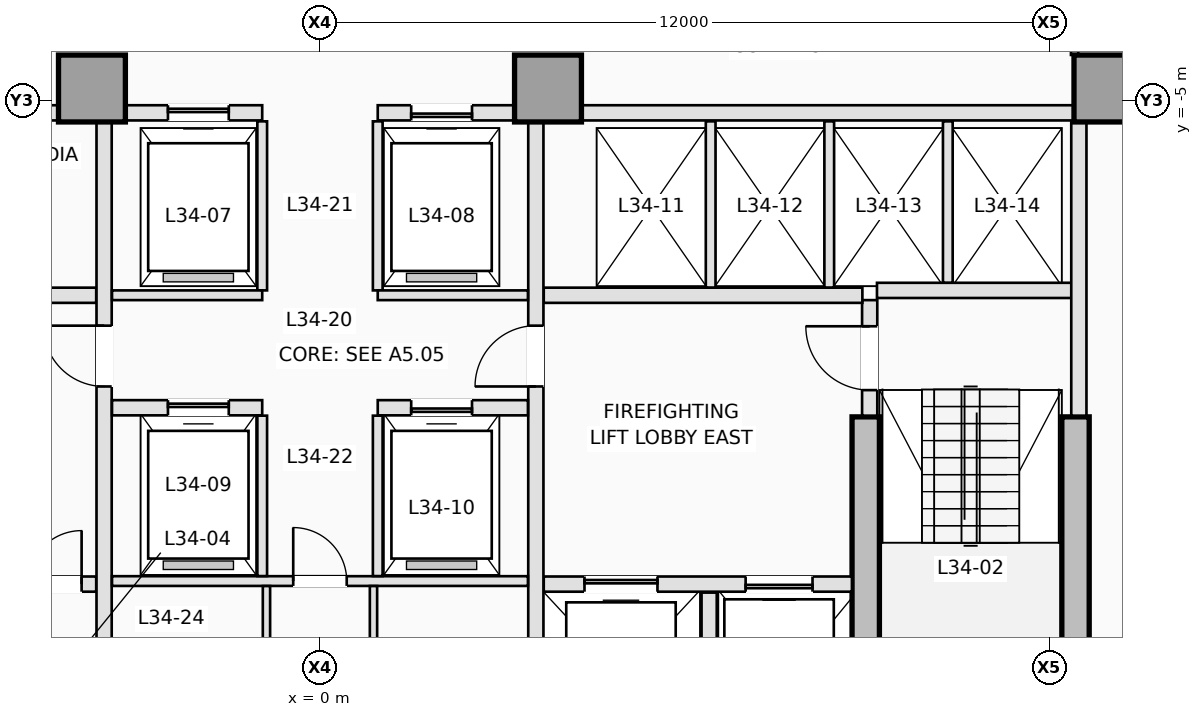
"""IFC4 building model, lengths in metres.
Left out: names, types, materials, properties, quantities, classifications, styles, units other than length and angle.
Written with IfcOpenShell. Run it as: python <this file> out.ifc"""

import sys

from ifc_helpers import new_model, si_unit, direction, frame, frame_2d, origin, origin_2d, place, context, subcontext, project, spatial, rectangle, extrude, element, fill, save


model = new_model("IFC4")
c1 = context("Model", 3, precision=1e-05, world=origin(), true_north=direction((0.0, 1.0)))
c2 = subcontext(c1, "Body", "Model", "MODEL_VIEW")
j1 = project(units=[si_unit("LENGTHUNIT", "METRE"), si_unit("PLANEANGLEUNIT", "RADIAN")], contexts=[c1])
p1 = place(None, origin())
s1 = spatial("IfcSite", under=j1, at=p1, CompositionType="ELEMENT")
p2 = place(p1, origin())
s2 = spatial("IfcBuilding", under=s1, at=p2, CompositionType="ELEMENT")
p3 = place(p2, frame((0.0, 0.0, 126.5)))
s3 = spatial("IfcBuildingStorey", under=s2, at=p3, CompositionType="ELEMENT", Elevation=126.5)
p4 = place(p3, frame((12.425, -15.725, 0.0), z_axis=(0.0, 0.0, 1.0), x_axis=(0.0, 1.0, 0.0)))
e1 = element("IfcWall", 1, at=p4, inside=s3, PredefinedType="SHEAR", context=c2, shape_type="SweptSolid", body=[
    extrude(rectangle(XDim=5.525, YDim=0.45, at=frame_2d((2.763, 0.0))), origin(), (0.0, 0.0, 1.0), 3.5),
])
p5 = place(p3, frame((8.975, -16.15, 0.0), z_axis=(0.0, 0.0, 1.0), x_axis=(0.0, 1.0, 0.0)))
e2 = element("IfcWall", 2, at=p5, inside=s3, PredefinedType="SHEAR", context=c2, shape_type="SweptSolid", body=[
    extrude(rectangle(XDim=5.95, YDim=0.45, at=frame_2d((2.975, 0.0))), origin(), (0.0, 0.0, 1.0), 3.5),
])
for number, where, z_axis, x_axis in (
    (3, (-3.75, -4.8, 0.0), (0.0, 0.0, 1.0), (1.0, 0.0, 0.0)),
    (4, (3.75, -4.8, 0.0), (0.0, 0.0, 1.0), (1.0, 0.0, 0.0)),
    (5, (12.95, -4.8, 0.0), (0.0, 0.0, 1.0), (1.0, 0.0, 0.0)),
):
    element("IfcColumn", number, at=place(p3, frame(where, z_axis=z_axis, x_axis=x_axis)), inside=s3, PredefinedType="COLUMN", context=c2, shape_type="SweptSolid", body=[
        extrude(rectangle(XDim=1.1, YDim=1.1, at=origin_2d()), origin(), (0.0, 0.0, 1.0), 3.5),
    ])
p6 = place(p3, frame((9.04, -10.18, 0.0), z_axis=(0.0, 0.0, 1.0), x_axis=(0.0, 1.0, 0.0)))
e6 = element("IfcWall", 6, at=p6, inside=s3, PredefinedType="PARTITIONING", context=c2, shape_type="SweptSolid", body=[
    extrude(rectangle(XDim=1.9, YDim=0.25, at=frame_2d((0.95, 0.0))), origin(), (0.0, 0.0, 1.0), 3.25),
])
p7 = place(p6, frame((0.42, 0.0, 0.0)))
e7 = element("IfcOpeningElement", 7, at=p7, cuts=e6, PredefinedType="OPENING", context=c2, shape_type="SweptSolid", body=[
    extrude(rectangle(XDim=1.05, YDim=2.15, at=frame_2d((0.525, 1.075))), frame((0.0, 0.135, 0.0), z_axis=(0.0, -1.0, 0.0), x_axis=(1.0, 0.0, 0.0)), (0.0, 0.0, 1.0), 0.27),
])
p8 = place(p3, frame((9.16, -8.12, 0.0), z_axis=(0.0, 0.0, 1.0), x_axis=(1.0, 0.0, 0.0)))
e8 = element("IfcWall", 8, at=p8, inside=s3, PredefinedType="PARTITIONING", context=c2, shape_type="SweptSolid", body=[
    extrude(rectangle(XDim=3.22, YDim=0.25, at=frame_2d((1.61, 0.0))), origin(), (0.0, 0.0, 1.0), 3.25),
])
p9 = place(p3, frame((12.48, -10.18, 0.0), z_axis=(0.0, 0.0, 1.0), x_axis=(0.0, 1.0, 0.0)))
e9 = element("IfcWall", 9, at=p9, inside=s3, PredefinedType="PARTITIONING", context=c2, shape_type="SweptSolid", body=[
    extrude(rectangle(XDim=4.828, YDim=0.25, at=frame_2d((2.414, 0.0))), origin(), (0.0, 0.0, 1.0), 3.25),
])
p10 = place(p3, frame((-8.748, -12.95, 0.0), z_axis=(0.0, 0.0, 1.0), x_axis=(1.0, 0.0, 0.0)))
e10 = element("IfcWall", 10, at=p10, inside=s3, PredefinedType="PARTITIONING", context=c2, shape_type="SweptSolid", body=[
    extrude(rectangle(XDim=5.068, YDim=0.25, at=frame_2d((2.534, 0.0))), origin(), (0.0, 0.0, 1.0), 3.25),
])
p11 = place(p10, frame((0.648, 0.0, 0.0)))
e11 = element("IfcOpeningElement", 11, at=p11, cuts=e10, PredefinedType="OPENING", context=c2, shape_type="SweptSolid", body=[
    extrude(rectangle(XDim=1.1, YDim=2.15, at=frame_2d((0.55, 1.075))), frame((0.0, 0.135, 0.0), z_axis=(0.0, -1.0, 0.0), x_axis=(1.0, 0.0, 0.0)), (0.0, 0.0, 1.0), 0.27),
])
p12 = place(p10, frame((2.548, 0.0, 0.0)))
e12 = element("IfcOpeningElement", 12, at=p12, cuts=e10, PredefinedType="OPENING", context=c2, shape_type="SweptSolid", body=[
    extrude(rectangle(XDim=0.88, YDim=2.1, at=frame_2d((0.44, 1.05))), frame((0.0, 0.135, 0.0), z_axis=(0.0, -1.0, 0.0), x_axis=(1.0, 0.0, 0.0)), (0.0, 0.0, 1.0), 0.27),
])
p13 = place(p10, frame((3.948, 0.0, 0.0)))
e13 = element("IfcOpeningElement", 13, at=p13, cuts=e10, PredefinedType="OPENING", context=c2, shape_type="SweptSolid", body=[
    extrude(rectangle(XDim=0.88, YDim=2.1, at=frame_2d((0.44, 1.05))), frame((0.0, 0.135, 0.0), z_axis=(0.0, -1.0, 0.0), x_axis=(1.0, 0.0, 0.0)), (0.0, 0.0, 1.0), 0.27),
])
p14 = place(p3, frame((3.68, -12.95, 0.0), z_axis=(0.0, 0.0, 1.0), x_axis=(1.0, 0.0, 0.0)))
e14 = element("IfcWall", 14, at=p14, inside=s3, PredefinedType="PARTITIONING", context=c2, shape_type="SweptSolid", body=[
    extrude(rectangle(XDim=5.068, YDim=0.25, at=frame_2d((2.534, 0.0))), origin(), (0.0, 0.0, 1.0), 3.25),
])
p15 = place(p14, frame((3.32, 0.0, 0.0)))
e15 = element("IfcOpeningElement", 15, at=p15, cuts=e14, PredefinedType="OPENING", context=c2, shape_type="SweptSolid", body=[
    extrude(rectangle(XDim=1.1, YDim=2.15, at=frame_2d((0.55, 1.075))), frame((0.0, 0.135, 0.0), z_axis=(0.0, -1.0, 0.0), x_axis=(1.0, 0.0, 0.0)), (0.0, 0.0, 1.0), 0.27),
])
p16 = place(p14, frame((0.67, 0.0, 0.0)))
e16 = element("IfcOpeningElement", 16, at=p16, cuts=e14, PredefinedType="OPENING", context=c2, shape_type="SweptSolid", body=[
    extrude(rectangle(XDim=1.2, YDim=2.15, at=frame_2d((0.6, 1.075))), frame((0.0, 0.135, 0.0), z_axis=(0.0, -1.0, 0.0), x_axis=(1.0, 0.0, 0.0)), (0.0, 0.0, 1.0), 0.27),
])
p17 = place(p3, frame((6.4, -15.92, 0.0), z_axis=(0.0, 0.0, 1.0), x_axis=(0.0, 1.0, 0.0)))
e17 = element("IfcWall", 17, at=p17, inside=s3, PredefinedType="PARTITIONING", context=c2, shape_type="SweptSolid", body=[
    extrude(rectangle(XDim=2.83, YDim=0.25, at=frame_2d((1.415, 0.0))), origin(), (0.0, 0.0, 1.0), 3.25),
])
for number, where, z_axis, x_axis in (
    (18, (-8.92, -8.2, 0.0), (0.0, 0.0, 1.0), (1.0, 0.0, 0.0)),
    (19, (3.68, -8.2, 0.0), (0.0, 0.0, 1.0), (1.0, 0.0, 0.0)),
):
    element("IfcWall", number, at=place(p3, frame(where, z_axis=z_axis, x_axis=x_axis)), inside=s3, PredefinedType="PARTITIONING", context=c2, shape_type="SweptSolid", body=[
        extrude(rectangle(XDim=5.24, YDim=0.25, at=frame_2d((2.62, 0.0))), origin(), (0.0, 0.0, 1.0), 3.25),
    ])
p18 = place(p3, frame((-3.55, -15.798, 0.0), z_axis=(0.0, 0.0, 1.0), x_axis=(0.0, 1.0, 0.0)))
e20 = element("IfcWall", 20, at=p18, inside=s3, PredefinedType="PARTITIONING", context=c2, shape_type="SweptSolid", body=[
    extrude(rectangle(XDim=10.446, YDim=0.25, at=frame_2d((5.223, 0.0))), origin(), (0.0, 0.0, 1.0), 3.25),
])
p19 = place(p18, frame((6.098, 0.0, 0.0)))
e21 = element("IfcOpeningElement", 21, at=p19, cuts=e20, PredefinedType="OPENING", context=c2, shape_type="SweptSolid", body=[
    extrude(rectangle(XDim=1.0, YDim=2.15, at=frame_2d((0.5, 1.075))), frame((0.0, 0.135, 0.0), z_axis=(0.0, -1.0, 0.0), x_axis=(1.0, 0.0, 0.0)), (0.0, 0.0, 1.0), 0.27),
])
p20 = place(p3, frame((3.55, -15.798, 0.0), z_axis=(0.0, 0.0, 1.0), x_axis=(0.0, 1.0, 0.0)))
e22 = element("IfcWall", 22, at=p20, inside=s3, PredefinedType="PARTITIONING", context=c2, shape_type="SweptSolid", body=[
    extrude(rectangle(XDim=10.446, YDim=0.25, at=frame_2d((5.223, 0.0))), origin(), (0.0, 0.0, 1.0), 3.25),
])
p21 = place(p20, frame((6.098, 0.0, 0.0)))
e23 = element("IfcOpeningElement", 23, at=p21, cuts=e22, PredefinedType="OPENING", context=c2, shape_type="SweptSolid", body=[
    extrude(rectangle(XDim=1.0, YDim=2.15, at=frame_2d((0.5, 1.075))), frame((0.0, 0.135, 0.0), z_axis=(0.0, -1.0, 0.0), x_axis=(1.0, 0.0, 0.0)), (0.0, 0.0, 1.0), 0.27),
])
p22 = place(p3, frame((-12.398, -5.2, 0.0), z_axis=(0.0, 0.0, 1.0), x_axis=(1.0, 0.0, 0.0)))
e24 = element("IfcWall", 24, at=p22, inside=s3, PredefinedType="PARTITIONING", context=c2, shape_type="SweptSolid", body=[
    extrude(rectangle(XDim=8.096, YDim=0.25, at=frame_2d((4.048, 0.0))), origin(), (0.0, 0.0, 1.0), 3.25),
])
p23 = place(p22, frame((2.968, 0.0, 0.0)))
e25 = element("IfcOpeningElement", 25, at=p23, cuts=e24, PredefinedType="OPENING", context=c2, shape_type="SweptSolid", body=[
    extrude(rectangle(XDim=0.92, YDim=2.12, at=frame_2d((0.46, 1.06))), frame((0.0, 0.135, 0.0), z_axis=(0.0, -1.0, 0.0), x_axis=(1.0, 0.0, 0.0)), (0.0, 0.0, 1.0), 0.27),
])
p24 = place(p22, frame((6.068, 0.0, 0.0)))
e26 = element("IfcOpeningElement", 26, at=p24, cuts=e24, PredefinedType="OPENING", context=c2, shape_type="SweptSolid", body=[
    extrude(rectangle(XDim=0.92, YDim=2.12, at=frame_2d((0.46, 1.06))), frame((0.0, 0.135, 0.0), z_axis=(0.0, -1.0, 0.0), x_axis=(1.0, 0.0, 0.0)), (0.0, 0.0, 1.0), 0.27),
])
p25 = place(p3, frame((4.302, -5.2, 0.0), z_axis=(0.0, 0.0, 1.0), x_axis=(1.0, 0.0, 0.0)))
e27 = element("IfcWall", 27, at=p25, inside=s3, PredefinedType="PARTITIONING", context=c2, shape_type="SweptSolid", body=[
    extrude(rectangle(XDim=8.096, YDim=0.25, at=frame_2d((4.048, 0.0))), origin(), (0.0, 0.0, 1.0), 3.25),
])
p26 = place(p3, frame((-3.198, -5.2, 0.0), z_axis=(0.0, 0.0, 1.0), x_axis=(1.0, 0.0, 0.0)))
e28 = element("IfcWall", 28, at=p26, inside=s3, PredefinedType="PARTITIONING", context=c2, shape_type="SweptSolid", body=[
    extrude(rectangle(XDim=2.248, YDim=0.25, at=frame_2d((1.124, 0.0))), origin(), (0.0, 0.0, 1.0), 3.25),
])
p27 = place(p26, frame((0.698, 0.0, 0.0)))
e29 = element("IfcOpeningElement", 29, at=p27, cuts=e28, PredefinedType="OPENING", context=c2, shape_type="SweptSolid", body=[
    extrude(rectangle(XDim=1.0, YDim=2.15, at=frame_2d((0.5, 1.075))), frame((0.0, 0.135, 0.0), z_axis=(0.0, -1.0, 0.0), x_axis=(1.0, 0.0, 0.0)), (0.0, 0.0, 1.0), 0.27),
])
p28 = place(p3, frame((0.95, -5.2, 0.0), z_axis=(0.0, 0.0, 1.0), x_axis=(1.0, 0.0, 0.0)))
e30 = element("IfcWall", 30, at=p28, inside=s3, PredefinedType="PARTITIONING", context=c2, shape_type="SweptSolid", body=[
    extrude(rectangle(XDim=2.248, YDim=0.25, at=frame_2d((1.124, 0.0))), origin(), (0.0, 0.0, 1.0), 3.25),
])
p29 = place(p28, frame((0.55, 0.0, 0.0)))
e31 = element("IfcOpeningElement", 31, at=p29, cuts=e30, PredefinedType="OPENING", context=c2, shape_type="SweptSolid", body=[
    extrude(rectangle(XDim=1.0, YDim=2.15, at=frame_2d((0.5, 1.075))), frame((0.0, 0.135, 0.0), z_axis=(0.0, -1.0, 0.0), x_axis=(1.0, 0.0, 0.0)), (0.0, 0.0, 1.0), 0.27),
])
for number, where, z_axis, x_axis in (
    (32, (6.425, -8.073, 0.0), (0.0, 0.0, 1.0), (0.0, 1.0, 0.0)),
    (33, (8.375, -8.073, 0.0), (0.0, 0.0, 1.0), (0.0, 1.0, 0.0)),
):
    element("IfcWall", number, at=place(p3, frame(where, z_axis=z_axis, x_axis=x_axis)), inside=s3, PredefinedType="PARTITIONING", context=c2, shape_type="SweptSolid", body=[
        extrude(rectangle(XDim=2.733, YDim=0.16, at=frame_2d((1.366, 0.0))), origin(), (0.0, 0.0, 1.0), 3.25),
    ])
p30 = place(p3, frame((10.325, -7.993, 0.0), z_axis=(0.0, 0.0, 1.0), x_axis=(0.0, 1.0, 0.0)))
e34 = element("IfcWall", 34, at=p30, inside=s3, PredefinedType="PARTITIONING", context=c2, shape_type="SweptSolid", body=[
    extrude(rectangle(XDim=2.653, YDim=0.16, at=frame_2d((1.326, 0.0))), origin(), (0.0, 0.0, 1.0), 3.25),
])
for number, where, z_axis, x_axis in (
    (35, (-0.95, -8.12, 0.0), (0.0, 0.0, 1.0), (0.0, 1.0, 0.0)),
    (36, (0.95, -8.12, 0.0), (0.0, 0.0, 1.0), (0.0, 1.0, 0.0)),
):
    element("IfcWall", number, at=place(p3, frame(where, z_axis=z_axis, x_axis=x_axis)), inside=s3, PredefinedType="PARTITIONING", context=c2, shape_type="SweptSolid", body=[
        extrude(rectangle(XDim=2.78, YDim=0.16, at=frame_2d((1.39, 0.0))), origin(), (0.0, 0.0, 1.0), 3.25),
    ])
for number, where, z_axis, x_axis in (
    (37, (-3.42, -8.2, 0.0), (0.0, 0.0, 1.0), (1.0, 0.0, 0.0)),
    (38, (0.95, -8.2, 0.0), (0.0, 0.0, 1.0), (1.0, 0.0, 0.0)),
):
    element("IfcWall", number, at=place(p3, frame(where, z_axis=z_axis, x_axis=x_axis)), inside=s3, PredefinedType="PARTITIONING", context=c2, shape_type="SweptSolid", body=[
        extrude(rectangle(XDim=2.47, YDim=0.16, at=frame_2d((1.235, 0.0))), origin(), (0.0, 0.0, 1.0), 3.25),
    ])
p31 = place(p3, frame((-3.42, -10.05, 0.0), z_axis=(0.0, 0.0, 1.0), x_axis=(1.0, 0.0, 0.0)))
e39 = element("IfcWall", 39, at=p31, inside=s3, PredefinedType="PARTITIONING", context=c2, shape_type="SweptSolid", body=[
    extrude(rectangle(XDim=2.47, YDim=0.25, at=frame_2d((1.235, 0.0))), origin(), (0.0, 0.0, 1.0), 3.25),
])
p32 = place(p31, frame((0.92, 0.0, 0.0)))
e40 = element("IfcOpeningElement", 40, at=p32, cuts=e39, PredefinedType="OPENING", context=c2, shape_type="SweptSolid", body=[
    extrude(rectangle(XDim=1.0, YDim=2.15, at=frame_2d((0.5, 1.075))), frame((0.0, 0.135, 0.0), z_axis=(0.0, -1.0, 0.0), x_axis=(1.0, 0.0, 0.0)), (0.0, 0.0, 1.0), 0.27),
])
p33 = place(p3, frame((0.95, -10.05, 0.0), z_axis=(0.0, 0.0, 1.0), x_axis=(1.0, 0.0, 0.0)))
e41 = element("IfcWall", 41, at=p33, inside=s3, PredefinedType="PARTITIONING", context=c2, shape_type="SweptSolid", body=[
    extrude(rectangle(XDim=2.47, YDim=0.25, at=frame_2d((1.235, 0.0))), origin(), (0.0, 0.0, 1.0), 3.25),
])
p34 = place(p33, frame((0.55, 0.0, 0.0)))
e42 = element("IfcOpeningElement", 42, at=p34, cuts=e41, PredefinedType="OPENING", context=c2, shape_type="SweptSolid", body=[
    extrude(rectangle(XDim=1.0, YDim=2.15, at=frame_2d((0.5, 1.075))), frame((0.0, 0.135, 0.0), z_axis=(0.0, -1.0, 0.0), x_axis=(1.0, 0.0, 0.0)), (0.0, 0.0, 1.0), 0.27),
])
p35 = place(p3, frame((-3.42, -12.9, 0.0), z_axis=(0.0, 0.0, 1.0), x_axis=(1.0, 0.0, 0.0)))
e43 = element("IfcWall", 43, at=p35, inside=s3, PredefinedType="PARTITIONING", context=c2, shape_type="SweptSolid", body=[
    extrude(rectangle(XDim=6.84, YDim=0.16, at=frame_2d((3.42, 0.0))), origin(), (0.0, 0.0, 1.0), 3.25),
])
p36 = place(p35, frame((2.98, 0.0, 0.0)))
e44 = element("IfcOpeningElement", 44, at=p36, cuts=e43, PredefinedType="OPENING", context=c2, shape_type="SweptSolid", body=[
    extrude(rectangle(XDim=0.88, YDim=2.12, at=frame_2d((0.44, 1.06))), frame((0.0, 0.09, 0.0), z_axis=(0.0, -1.0, 0.0), x_axis=(1.0, 0.0, 0.0)), (0.0, 0.0, 1.0), 0.18),
])
for number, where, z_axis, x_axis in (
    (45, (-0.95, -12.818, 0.0), (0.0, 0.0, 1.0), (0.0, 1.0, 0.0)),
    (46, (0.95, -12.818, 0.0), (0.0, 0.0, 1.0), (0.0, 1.0, 0.0)),
):
    element("IfcWall", number, at=place(p3, frame(where, z_axis=z_axis, x_axis=x_axis)), inside=s3, PredefinedType="PARTITIONING", context=c2, shape_type="SweptSolid", body=[
        extrude(rectangle(XDim=2.638, YDim=0.16, at=frame_2d((1.319, 0.0))), origin(), (0.0, 0.0, 1.0), 3.25),
    ])
p37 = place(p3, frame((-0.88, -16.02, 0.0), z_axis=(0.0, 0.0, 1.0), x_axis=(0.0, 1.0, 0.0)))
e47 = element("IfcWall", 47, at=p37, inside=s3, PredefinedType="PARTITIONING", context=c2, shape_type="SweptSolid", body=[
    extrude(rectangle(XDim=3.038, YDim=0.12, at=frame_2d((1.519, 0.0))), origin(), (0.0, 0.0, 1.0), 3.25),
])
p38 = place(p37, frame((1.05, 0.0, 0.0)))
e48 = element("IfcOpeningElement", 48, at=p38, cuts=e47, PredefinedType="OPENING", context=c2, shape_type="SweptSolid", body=[
    extrude(rectangle(XDim=0.88, YDim=2.12, at=frame_2d((0.44, 1.06))), frame((0.0, 0.07, 0.0), z_axis=(0.0, -1.0, 0.0), x_axis=(1.0, 0.0, 0.0)), (0.0, 0.0, 1.0), 0.14),
])
p39 = place(p3, frame((0.88, -16.02, 0.0), z_axis=(0.0, 0.0, 1.0), x_axis=(0.0, 1.0, 0.0)))
e49 = element("IfcWall", 49, at=p39, inside=s3, PredefinedType="PARTITIONING", context=c2, shape_type="SweptSolid", body=[
    extrude(rectangle(XDim=3.038, YDim=0.12, at=frame_2d((1.519, 0.0))), origin(), (0.0, 0.0, 1.0), 3.25),
])
p40 = place(p39, frame((1.05, 0.0, 0.0)))
e50 = element("IfcOpeningElement", 50, at=p40, cuts=e49, PredefinedType="OPENING", context=c2, shape_type="SweptSolid", body=[
    extrude(rectangle(XDim=0.88, YDim=2.12, at=frame_2d((0.44, 1.06))), frame((0.0, 0.07, 0.0), z_axis=(0.0, -1.0, 0.0), x_axis=(1.0, 0.0, 0.0)), (0.0, 0.0, 1.0), 0.14),
])
p41 = place(p3, frame((12.41, -2.462, 0.0), z_axis=(0.0, 0.0, 1.0), x_axis=(0.0, -1.0, 0.0)))
e51 = element("IfcWall", 51, at=p41, inside=s3, PredefinedType="PARTITIONING", context=c2, shape_type="SweptSolid", body=[
    extrude(rectangle(XDim=1.786, YDim=0.12, at=frame_2d((0.893, 0.0))), origin(), (0.0, 0.0, 1.0), 3.25),
])
p42 = place(p41, frame((0.623, 0.0, 0.0)))
e52 = element("IfcOpeningElement", 52, at=p42, cuts=e51, PredefinedType="OPENING", context=c2, shape_type="SweptSolid", body=[
    extrude(rectangle(XDim=0.92, YDim=2.12, at=frame_2d((0.46, 1.06))), frame((0.0, 0.07, 0.0), z_axis=(0.0, -1.0, 0.0), x_axis=(1.0, 0.0, 0.0)), (0.0, 0.0, 1.0), 0.14),
])
p43 = place(p27, origin())
e53 = element("IfcDoor", 53, at=p43, inside=s3, OperationType="SLIDING_TO_LEFT", PredefinedType="DOOR", context=c2, shape_type="SweptSolid", body=[
    extrude(rectangle(XDim=1.0, YDim=2.15, at=frame_2d((0.5, 1.075))), frame((0.0, 0.025, 0.0), z_axis=(0.0, -1.0, 0.0), x_axis=(1.0, 0.0, 0.0)), (0.0, 0.0, 1.0), 0.05),
])
fill(e29, e53)
p44 = place(p29, origin())
e54 = element("IfcDoor", 54, at=p44, inside=s3, OperationType="SLIDING_TO_RIGHT", PredefinedType="DOOR", context=c2, shape_type="SweptSolid", body=[
    extrude(rectangle(XDim=1.0, YDim=2.15, at=frame_2d((0.5, 1.075))), frame((0.0, 0.025, 0.0), z_axis=(0.0, -1.0, 0.0), x_axis=(1.0, 0.0, 0.0)), (0.0, 0.0, 1.0), 0.05),
])
fill(e31, e54)
p45 = place(p15, origin())
e55 = element("IfcDoor", 55, at=p45, inside=s3, OperationType="SLIDING_TO_RIGHT", PredefinedType="DOOR", context=c2, shape_type="SweptSolid", body=[
    extrude(rectangle(XDim=1.1, YDim=2.15, at=frame_2d((0.55, 1.075))), frame((0.0, 0.025, 0.0), z_axis=(0.0, -1.0, 0.0), x_axis=(1.0, 0.0, 0.0)), (0.0, 0.0, 1.0), 0.05),
])
fill(e15, e55)
p46 = place(p16, origin())
e56 = element("IfcDoor", 56, at=p46, inside=s3, OperationType="SLIDING_TO_LEFT", PredefinedType="DOOR", context=c2, shape_type="SweptSolid", body=[
    extrude(rectangle(XDim=1.2, YDim=2.15, at=frame_2d((0.6, 1.075))), frame((0.0, 0.025, 0.0), z_axis=(0.0, -1.0, 0.0), x_axis=(1.0, 0.0, 0.0)), (0.0, 0.0, 1.0), 0.05),
])
fill(e16, e56)
p47 = place(p32, origin())
e57 = element("IfcDoor", 57, at=p47, inside=s3, OperationType="SLIDING_TO_LEFT", PredefinedType="DOOR", context=c2, shape_type="SweptSolid", body=[
    extrude(rectangle(XDim=1.0, YDim=2.15, at=frame_2d((0.5, 1.075))), frame((0.0, 0.025, 0.0), z_axis=(0.0, -1.0, 0.0), x_axis=(1.0, 0.0, 0.0)), (0.0, 0.0, 1.0), 0.05),
])
fill(e40, e57)
p48 = place(p34, origin())
e58 = element("IfcDoor", 58, at=p48, inside=s3, OperationType="SLIDING_TO_RIGHT", PredefinedType="DOOR", context=c2, shape_type="SweptSolid", body=[
    extrude(rectangle(XDim=1.0, YDim=2.15, at=frame_2d((0.5, 1.075))), frame((0.0, 0.025, 0.0), z_axis=(0.0, -1.0, 0.0), x_axis=(1.0, 0.0, 0.0)), (0.0, 0.0, 1.0), 0.05),
])
fill(e42, e58)
p49 = place(p7, origin())
e59 = element("IfcDoor", 59, at=p49, inside=s3, OperationType="SINGLE_SWING_RIGHT", PredefinedType="DOOR", context=c2, shape_type="SweptSolid", body=[
    extrude(rectangle(XDim=1.05, YDim=2.15, at=frame_2d((0.525, 1.075))), frame((0.0, 0.025, 0.0), z_axis=(0.0, -1.0, 0.0), x_axis=(1.0, 0.0, 0.0)), (0.0, 0.0, 1.0), 0.05),
])
fill(e7, e59)
p50 = place(p13, origin())
e60 = element("IfcDoor", 60, at=p50, inside=s3, OperationType="SINGLE_SWING_RIGHT", PredefinedType="TRAPDOOR", context=c2, shape_type="SweptSolid", body=[
    extrude(rectangle(XDim=0.88, YDim=2.1, at=frame_2d((0.44, 1.05))), frame((0.0, 0.025, 0.0), z_axis=(0.0, -1.0, 0.0), x_axis=(1.0, 0.0, 0.0)), (0.0, 0.0, 1.0), 0.05),
])
fill(e13, e60)
p51 = place(p19, origin())
e61 = element("IfcDoor", 61, at=p51, inside=s3, OperationType="SINGLE_SWING_RIGHT", PredefinedType="DOOR", context=c2, shape_type="SweptSolid", body=[
    extrude(rectangle(XDim=1.0, YDim=2.15, at=frame_2d((0.5, 1.075))), frame((0.0, 0.025, 0.0), z_axis=(0.0, -1.0, 0.0), x_axis=(1.0, 0.0, 0.0)), (0.0, 0.0, 1.0), 0.05),
])
fill(e21, e61)
p52 = place(p21, origin())
e62 = element("IfcDoor", 62, at=p52, inside=s3, OperationType="SINGLE_SWING_LEFT", PredefinedType="DOOR", context=c2, shape_type="SweptSolid", body=[
    extrude(rectangle(XDim=1.0, YDim=2.15, at=frame_2d((0.5, 1.075))), frame((0.0, 0.025, 0.0), z_axis=(0.0, -1.0, 0.0), x_axis=(1.0, 0.0, 0.0)), (0.0, 0.0, 1.0), 0.05),
])
fill(e23, e62)
p53 = place(p36, origin())
e63 = element("IfcDoor", 63, at=p53, inside=s3, OperationType="SINGLE_SWING_LEFT", PredefinedType="DOOR", context=c2, shape_type="SweptSolid", body=[
    extrude(rectangle(XDim=0.88, YDim=2.12, at=frame_2d((0.44, 1.06))), frame((0.0, 0.025, 0.0), z_axis=(0.0, -1.0, 0.0), x_axis=(1.0, 0.0, 0.0)), (0.0, 0.0, 1.0), 0.05),
])
fill(e44, e63)
save(model, sys.argv[1])
